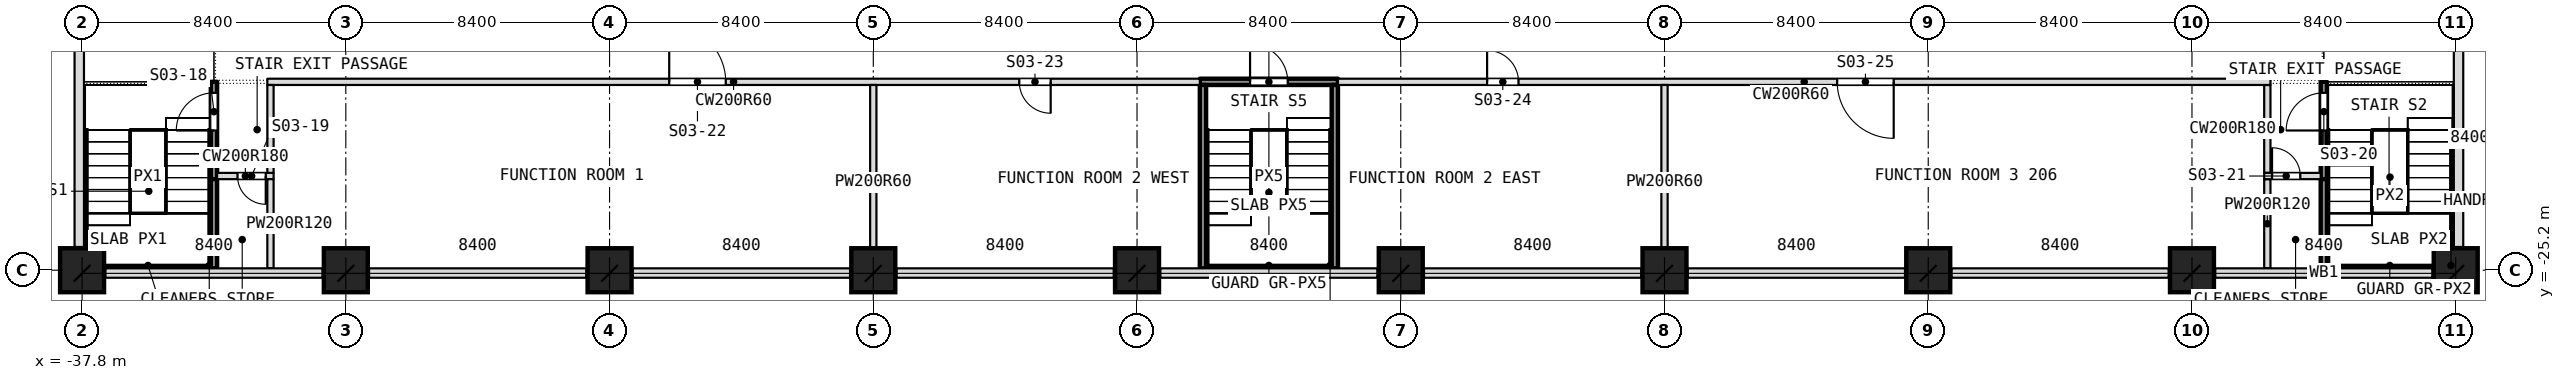
"""IFC4 building model, lengths in metres.
Left out: names, types, materials, properties, quantities, classifications, styles, units other than length and angle.
Written with IfcOpenShell. Run it as: python <this file> out.ifc"""

import sys

from ifc_helpers import new_model, si_unit, direction, frame, frame_2d, origin, origin_2d, place, context, subcontext, project, spatial, polyline, rectangle, outline, extrude, element, fill, save


model = new_model("IFC4")
c1 = context("Model", 3, precision=1e-05, world=origin(), true_north=direction((0.0, 1.0)))
c2 = subcontext(c1, "Body", "Model", "MODEL_VIEW")
j1 = project(units=[si_unit("LENGTHUNIT", "METRE"), si_unit("PLANEANGLEUNIT", "RADIAN")], contexts=[c1])
p1 = place(None, origin())
s1 = spatial("IfcSite", under=j1, at=p1, CompositionType="ELEMENT")
p2 = place(p1, origin())
s2 = spatial("IfcBuilding", under=s1, at=p2, CompositionType="ELEMENT")
p3 = place(p2, frame((0.0, 0.0, 13.0)))
s3 = spatial("IfcBuildingStorey", under=s2, at=p3, CompositionType="ELEMENT", Elevation=13.0)
for number, where, z_axis, x_axis in (
    (1, (-37.8, -25.2, 0.0), (0.0, 0.0, 1.0), (1.0, 0.0, 0.0)),
    (2, (-29.4, -25.2, 0.0), (0.0, 0.0, 1.0), (1.0, 0.0, 0.0)),
    (3, (-21.0, -25.2, 0.0), (0.0, 0.0, 1.0), (1.0, 0.0, 0.0)),
    (4, (-12.6, -25.2, 0.0), (0.0, 0.0, 1.0), (1.0, 0.0, 0.0)),
    (5, (-4.2, -25.2, 0.0), (0.0, 0.0, 1.0), (1.0, 0.0, 0.0)),
    (6, (4.2, -25.2, 0.0), (0.0, 0.0, 1.0), (1.0, 0.0, 0.0)),
    (7, (12.6, -25.2, 0.0), (0.0, 0.0, 1.0), (1.0, 0.0, 0.0)),
    (8, (21.0, -25.2, 0.0), (0.0, 0.0, 1.0), (1.0, 0.0, 0.0)),
    (9, (29.4, -25.2, 0.0), (0.0, 0.0, 1.0), (1.0, 0.0, 0.0)),
    (10, (37.8, -25.2, 0.0), (0.0, 0.0, 1.0), (1.0, 0.0, 0.0)),
):
    element("IfcColumn", number, at=place(p3, frame(where, z_axis=z_axis, x_axis=x_axis)), inside=s3, PredefinedType="COLUMN", context=c2, shape_type="SweptSolid", body=[
        extrude(rectangle(XDim=1.4, YDim=1.4, at=origin_2d()), origin(), (0.0, 0.0, 1.0), 8.0),
    ])
p4 = place(p3, frame((37.8, -18.0, 7.414), z_axis=(1.0, 0.0, 0.0), x_axis=(0.0, 0.449444543056, 0.893308234999)))
e11 = element("IfcWall", 11, at=p4, inside=s3, PredefinedType="SOLIDWALL", context=c2, shape_type="SweptSolid", body=[
    extrude(outline(polyline([(0.0, 0.0), (0.656, 0.0), (-0.016, 1.335), (-7.162, -2.26), (0.0, 0.0)])), origin(), (0.0, 0.0, -1.0), 4.2),
])
p5 = place(p3, frame((-37.8, -18.0, 7.414), z_axis=(-1.0, 0.0, 0.0), x_axis=(0.0, -0.159774095721, -0.987153604226)))
e12 = element("IfcWall", 12, at=p5, inside=s3, PredefinedType="SOLIDWALL", context=c2, shape_type="SweptSolid", body=[
    extrude(outline(polyline([(0.0, 0.0), (7.51, 2.22e-16), (-0.387, 1.278), (-0.626, -0.197), (0.0, 0.0)])), origin(), (0.0, 0.0, -1.0), 4.2),
])
p6 = place(p3, frame((33.6, -25.14, 0.0), z_axis=(0.0, 0.0, 1.0), x_axis=(0.0, 1.0, 0.0)))
e13 = element("IfcWall", 13, at=p6, inside=s3, PredefinedType="PARTITIONING", context=c2, shape_type="SweptSolid", body=[
    extrude(rectangle(XDim=3.04, YDim=0.2, at=frame_2d((1.52, 0.0))), origin(), (0.0, 0.0, 1.0), 7.68),
])
p7 = place(p3, frame((33.6, -22.3, 0.0), z_axis=(0.0, 0.0, 1.0), x_axis=(0.0, 1.0, 0.0)))
e14 = element("IfcWall", 14, at=p7, inside=s3, PredefinedType="PARTITIONING", context=c2, shape_type="SweptSolid", body=[
    extrude(rectangle(XDim=3.1, YDim=0.2, at=frame_2d((1.55, 0.0))), origin(), (0.0, 0.0, 1.0), 7.68),
])
p8 = place(p7, frame((1.55, 0.0, 0.0)))
e15 = element("IfcOpeningElement", 15, at=p8, cuts=e14, PredefinedType="OPENING", context=c2, shape_type="SweptSolid", body=[
    extrude(rectangle(XDim=1.2, YDim=2.1, at=frame_2d((0.6, 1.05))), frame((0.0, 0.1, 0.0), z_axis=(0.0, -1.0, 0.0), x_axis=(1.0, 0.0, 0.0)), (0.0, 0.0, 1.0), 0.2),
])
p9 = place(p3, frame((31.8, -25.14, 0.0), z_axis=(0.0, 0.0, 1.0), x_axis=(0.0, 1.0, 0.0)))
e16 = element("IfcWall", 16, at=p9, inside=s3, PredefinedType="PARTITIONING", context=c2, shape_type="SweptSolid", body=[
    extrude(rectangle(XDim=2.84, YDim=0.2, at=frame_2d((1.42, 0.0))), origin(), (0.0, 0.0, 1.0), 7.68),
])
p10 = place(p3, frame((31.8, -22.1, 0.0), z_axis=(0.0, 0.0, 1.0), x_axis=(0.0, 1.0, 0.0)))
e17 = element("IfcWall", 17, at=p10, inside=s3, PredefinedType="PARTITIONING", context=c2, shape_type="SweptSolid", body=[
    extrude(rectangle(XDim=2.8, YDim=0.2, at=frame_2d((1.4, 0.0))), origin(), (0.0, 0.0, 1.0), 7.68),
])
p11 = place(p3, frame((-33.5, -22.2, 0.0), z_axis=(0.0, 0.0, 1.0), x_axis=(1.0, 0.0, 0.0)))
e18 = element("IfcWall", 18, at=p11, inside=s3, PredefinedType="PARTITIONING", context=c2, shape_type="SweptSolid", body=[
    extrude(rectangle(XDim=1.8, YDim=0.2, at=frame_2d((0.9, 0.0))), origin(), (0.0, 0.0, 1.0), 7.68),
])
p12 = place(p11, frame((0.65, 0.0, 0.0)))
e19 = element("IfcOpeningElement", 19, at=p12, cuts=e18, PredefinedType="OPENING", context=c2, shape_type="SweptSolid", body=[
    extrude(rectangle(XDim=0.9, YDim=2.1, at=frame_2d((0.45, 1.05))), frame((0.0, 0.1, 0.0), z_axis=(0.0, -1.0, 0.0), x_axis=(1.0, 0.0, 0.0)), (0.0, 0.0, 1.0), 0.2),
])
p13 = place(p3, frame((31.7, -22.2, 0.0), z_axis=(0.0, 0.0, 1.0), x_axis=(1.0, 0.0, 0.0)))
e20 = element("IfcWall", 20, at=p13, inside=s3, PredefinedType="PARTITIONING", context=c2, shape_type="SweptSolid", body=[
    extrude(rectangle(XDim=1.8, YDim=0.2, at=frame_2d((0.9, 0.0))), origin(), (0.0, 0.0, 1.0), 7.68),
])
p14 = place(p13, frame((0.25, 0.0, 0.0)))
e21 = element("IfcOpeningElement", 21, at=p14, cuts=e20, PredefinedType="OPENING", context=c2, shape_type="SweptSolid", body=[
    extrude(rectangle(XDim=0.9, YDim=2.1, at=frame_2d((0.45, 1.05))), frame((0.0, 0.1, 0.0), z_axis=(0.0, -1.0, 0.0), x_axis=(1.0, 0.0, 0.0)), (0.0, 0.0, 1.0), 0.2),
])
p15 = place(p3, frame((-31.9, -19.2, 0.0), z_axis=(0.0, 0.0, 1.0), x_axis=(1.0, 0.0, 0.0)))
e22 = element("IfcWall", 22, at=p15, inside=s3, PredefinedType="PARTITIONING", context=c2, shape_type="SweptSolid", body=[
    extrude(rectangle(XDim=29.7, YDim=0.2, at=frame_2d((14.85, 0.0))), origin(), (0.0, 0.0, 1.0), 7.68),
])
p16 = place(p15, frame((12.8, 0.0, 0.0)))
e23 = element("IfcOpeningElement", 23, at=p16, cuts=e22, PredefinedType="OPENING", context=c2, shape_type="SweptSolid", body=[
    extrude(rectangle(XDim=1.8, YDim=2.1, at=frame_2d((0.9, 1.05))), frame((0.0, 0.1, 0.0), z_axis=(0.0, -1.0, 0.0), x_axis=(1.0, 0.0, 0.0)), (0.0, 0.0, 1.0), 0.2),
])
p17 = place(p15, frame((23.95, 0.0, 0.0)))
e24 = element("IfcOpeningElement", 24, at=p17, cuts=e22, PredefinedType="OPENING", context=c2, shape_type="SweptSolid", body=[
    extrude(rectangle(XDim=1.0, YDim=2.1, at=frame_2d((0.5, 1.05))), frame((0.0, 0.1, 0.0), z_axis=(0.0, -1.0, 0.0), x_axis=(1.0, 0.0, 0.0)), (0.0, 0.0, 1.0), 0.2),
])
p18 = place(p3, frame((2.2, -19.2, 0.0), z_axis=(0.0, 0.0, 1.0), x_axis=(1.0, 0.0, 0.0)))
e25 = element("IfcWall", 25, at=p18, inside=s3, PredefinedType="PARTITIONING", context=c2, shape_type="SweptSolid", body=[
    extrude(rectangle(XDim=29.7, YDim=0.2, at=frame_2d((14.85, 0.0))), origin(), (0.0, 0.0, 1.0), 7.68),
])
p19 = place(p18, frame((4.75, 0.0, 0.0)))
e26 = element("IfcOpeningElement", 26, at=p19, cuts=e25, PredefinedType="OPENING", context=c2, shape_type="SweptSolid", body=[
    extrude(rectangle(XDim=1.0, YDim=2.1, at=frame_2d((0.5, 1.05))), frame((0.0, 0.1, 0.0), z_axis=(0.0, -1.0, 0.0), x_axis=(1.0, 0.0, 0.0)), (0.0, 0.0, 1.0), 0.2),
])
p20 = place(p18, frame((15.9, 0.0, 0.0)))
e27 = element("IfcOpeningElement", 27, at=p20, cuts=e25, PredefinedType="OPENING", context=c2, shape_type="SweptSolid", body=[
    extrude(rectangle(XDim=1.8, YDim=2.1, at=frame_2d((0.9, 1.05))), frame((0.0, 0.1, 0.0), z_axis=(0.0, -1.0, 0.0), x_axis=(1.0, 0.0, 0.0)), (0.0, 0.0, 1.0), 0.2),
])
p21 = place(p3, frame((-2.2, -19.2, 0.0), z_axis=(0.0, 0.0, 1.0), x_axis=(1.0, 0.0, 0.0)))
e28 = element("IfcWall", 28, at=p21, inside=s3, PredefinedType="PARTITIONING", context=c2, shape_type="SweptSolid", body=[
    extrude(rectangle(XDim=4.4, YDim=0.2, at=frame_2d((2.2, 0.0))), origin(), (0.0, 0.0, 1.0), 7.68),
])
p22 = place(p21, frame((1.6, 0.0, 0.0)))
e29 = element("IfcOpeningElement", 29, at=p22, cuts=e28, PredefinedType="OPENING", context=c2, shape_type="SweptSolid", body=[
    extrude(rectangle(XDim=1.2, YDim=2.1, at=frame_2d((0.6, 1.05))), frame((0.0, 0.1, 0.0), z_axis=(0.0, -1.0, 0.0), x_axis=(1.0, 0.0, 0.0)), (0.0, 0.0, 1.0), 0.2),
])
p23 = place(p3, frame((12.6, -25.5, 0.0), z_axis=(0.0, 0.0, 1.0), x_axis=(0.0, 1.0, 0.0)))
e30 = element("IfcWall", 30, at=p23, inside=s3, PredefinedType="PARTITIONING", context=c2, shape_type="SweptSolid", body=[
    extrude(rectangle(XDim=6.2, YDim=0.2, at=frame_2d((3.1, 0.0))), origin(), (0.0, 0.0, 1.0), 7.68),
])
for number, where, z_axis, x_axis in (
    (31, (2.1, -25.14, 0.0), (0.0, 0.0, 1.0), (0.0, 1.0, 0.0)),
    (32, (-2.1, -25.14, 0.0), (0.0, 0.0, 1.0), (0.0, 1.0, 0.0)),
):
    element("IfcWall", number, at=place(p3, frame(where, z_axis=z_axis, x_axis=x_axis)), inside=s3, PredefinedType="PARTITIONING", context=c2, shape_type="SweptSolid", body=[
        extrude(rectangle(XDim=5.84, YDim=0.2, at=frame_2d((2.92, 0.0))), origin(), (0.0, 0.0, 1.0), 7.68),
    ])
p24 = place(p3, frame((-12.6, -25.5, 0.0), z_axis=(0.0, 0.0, 1.0), x_axis=(0.0, 1.0, 0.0)))
e33 = element("IfcWall", 33, at=p24, inside=s3, PredefinedType="PARTITIONING", context=c2, shape_type="SweptSolid", body=[
    extrude(rectangle(XDim=6.2, YDim=0.2, at=frame_2d((3.1, 0.0))), origin(), (0.0, 0.0, 1.0), 7.68),
])
p25 = place(p3, frame((-31.8, -25.14, 0.0), z_axis=(0.0, 0.0, 1.0), x_axis=(0.0, 1.0, 0.0)))
e34 = element("IfcWall", 34, at=p25, inside=s3, PredefinedType="PARTITIONING", context=c2, shape_type="SweptSolid", body=[
    extrude(rectangle(XDim=2.84, YDim=0.2, at=frame_2d((1.42, 0.0))), origin(), (0.0, 0.0, 1.0), 7.68),
])
p26 = place(p3, frame((-31.8, -22.1, 0.0), z_axis=(0.0, 0.0, 1.0), x_axis=(0.0, 1.0, 0.0)))
e35 = element("IfcWall", 35, at=p26, inside=s3, PredefinedType="PARTITIONING", context=c2, shape_type="SweptSolid", body=[
    extrude(rectangle(XDim=2.8, YDim=0.2, at=frame_2d((1.4, 0.0))), origin(), (0.0, 0.0, 1.0), 7.68),
])
p27 = place(p3, frame((-33.6, -25.14, 0.0), z_axis=(0.0, 0.0, 1.0), x_axis=(0.0, 1.0, 0.0)))
e36 = element("IfcWall", 36, at=p27, inside=s3, PredefinedType="PARTITIONING", context=c2, shape_type="SweptSolid", body=[
    extrude(rectangle(XDim=3.04, YDim=0.2, at=frame_2d((1.52, 0.0))), origin(), (0.0, 0.0, 1.0), 7.68),
])
p28 = place(p3, frame((-33.6, -22.3, 0.0), z_axis=(0.0, 0.0, 1.0), x_axis=(0.0, 1.0, 0.0)))
e37 = element("IfcWall", 37, at=p28, inside=s3, PredefinedType="PARTITIONING", context=c2, shape_type="SweptSolid", body=[
    extrude(rectangle(XDim=3.1, YDim=0.2, at=frame_2d((1.55, 0.0))), origin(), (0.0, 0.0, 1.0), 7.68),
])
p29 = place(p28, frame((1.55, 0.0, 0.0)))
e38 = element("IfcOpeningElement", 38, at=p29, cuts=e37, PredefinedType="OPENING", context=c2, shape_type="SweptSolid", body=[
    extrude(rectangle(XDim=1.2, YDim=2.1, at=frame_2d((0.6, 1.05))), frame((0.0, 0.1, 0.0), z_axis=(0.0, -1.0, 0.0), x_axis=(1.0, 0.0, 0.0)), (0.0, 0.0, 1.0), 0.2),
])
p30 = place(p3, frame((-37.06, -25.29, 0.0), z_axis=(0.0, 0.0, 1.0), x_axis=(1.0, 0.0, 0.0)))
e39 = element("IfcWall", 39, at=p30, inside=s3, PredefinedType="NOTDEFINED", context=c2, shape_type="SweptSolid", body=[
    extrude(rectangle(XDim=6.92, YDim=0.3, at=frame_2d((3.46, 0.0))), origin(), (0.0, 0.0, 1.0), 6.78),
])
for number, where, z_axis, x_axis in (
    (40, (-28.66, -25.29, 0.0), (0.0, 0.0, 1.0), (1.0, 0.0, 0.0)),
    (41, (-20.26, -25.29, 0.0), (0.0, 0.0, 1.0), (1.0, 0.0, 0.0)),
):
    element("IfcWall", number, at=place(p3, frame(where, z_axis=z_axis, x_axis=x_axis)), inside=s3, PredefinedType="NOTDEFINED", context=c2, shape_type="SweptSolid", body=[
        extrude(rectangle(XDim=6.92, YDim=0.3, at=frame_2d((3.46, 0.0))), origin(), (0.0, 0.0, 1.0), 6.78),
    ])
p31 = place(p3, frame((-11.86, -25.29, 0.0), z_axis=(0.0, 0.0, 1.0), x_axis=(1.0, 0.0, 0.0)))
e42 = element("IfcWall", 42, at=p31, inside=s3, PredefinedType="NOTDEFINED", context=c2, shape_type="SweptSolid", body=[
    extrude(rectangle(XDim=6.92, YDim=0.3, at=frame_2d((3.46, 0.0))), origin(), (0.0, 0.0, 1.0), 6.78),
])
p32 = place(p3, frame((-3.46, -25.29, 0.0), z_axis=(0.0, 0.0, 1.0), x_axis=(1.0, 0.0, 0.0)))
e43 = element("IfcWall", 43, at=p32, inside=s3, PredefinedType="NOTDEFINED", context=c2, shape_type="SweptSolid", body=[
    extrude(rectangle(XDim=6.92, YDim=0.3, at=frame_2d((3.46, 0.0))), origin(), (0.0, 0.0, 1.0), 6.78),
])
p33 = place(p3, frame((4.94, -25.29, 0.0), z_axis=(0.0, 0.0, 1.0), x_axis=(1.0, 0.0, 0.0)))
e44 = element("IfcWall", 44, at=p33, inside=s3, PredefinedType="NOTDEFINED", context=c2, shape_type="SweptSolid", body=[
    extrude(rectangle(XDim=6.92, YDim=0.3, at=frame_2d((3.46, 0.0))), origin(), (0.0, 0.0, 1.0), 6.78),
])
for number, where, z_axis, x_axis in (
    (45, (13.34, -25.29, 0.0), (0.0, 0.0, 1.0), (1.0, 0.0, 0.0)),
    (46, (21.74, -25.29, 0.0), (0.0, 0.0, 1.0), (1.0, 0.0, 0.0)),
):
    element("IfcWall", number, at=place(p3, frame(where, z_axis=z_axis, x_axis=x_axis)), inside=s3, PredefinedType="NOTDEFINED", context=c2, shape_type="SweptSolid", body=[
        extrude(rectangle(XDim=6.92, YDim=0.3, at=frame_2d((3.46, 0.0))), origin(), (0.0, 0.0, 1.0), 6.78),
    ])
p34 = place(p3, frame((30.14, -25.29, 0.0), z_axis=(0.0, 0.0, 1.0), x_axis=(1.0, 0.0, 0.0)))
e47 = element("IfcWall", 47, at=p34, inside=s3, PredefinedType="NOTDEFINED", context=c2, shape_type="SweptSolid", body=[
    extrude(rectangle(XDim=6.92, YDim=0.3, at=frame_2d((3.46, 0.0))), origin(), (0.0, 0.0, 1.0), 6.78),
])
for number, where, z_axis, x_axis in (
    (48, (37.89, -24.46, 0.0), (0.0, 0.0, 1.0), (0.0, 1.0, 0.0)),
    (49, (-37.89, -16.8, 0.0), (0.0, 0.0, 1.0), (0.0, -1.0, 0.0)),
):
    element("IfcWall", number, at=place(p3, frame(where, z_axis=z_axis, x_axis=x_axis)), inside=s3, PredefinedType="NOTDEFINED", context=c2, shape_type="SweptSolid", body=[
        extrude(rectangle(XDim=7.66, YDim=0.3, at=frame_2d((3.83, 0.0))), origin(), (0.0, 0.0, 1.0), 6.78),
    ])
p35 = place(p29, origin())
e50 = element("IfcDoor", 50, at=p35, inside=s3, OperationType="SINGLE_SWING_RIGHT", PredefinedType="DOOR", context=c2, shape_type="SweptSolid", body=[
    extrude(rectangle(XDim=1.2, YDim=2.1, at=frame_2d((0.6, 1.05))), frame((0.0, 0.025, 0.0), z_axis=(0.0, -1.0, 0.0), x_axis=(1.0, 0.0, 0.0)), (0.0, 0.0, 1.0), 0.05),
])
fill(e38, e50)
p36 = place(p12, origin())
e51 = element("IfcDoor", 51, at=p36, inside=s3, OperationType="SINGLE_SWING_LEFT", PredefinedType="DOOR", context=c2, shape_type="SweptSolid", body=[
    extrude(rectangle(XDim=0.9, YDim=2.1, at=frame_2d((0.45, 1.05))), frame((0.0, 0.025, 0.0), z_axis=(0.0, -1.0, 0.0), x_axis=(1.0, 0.0, 0.0)), (0.0, 0.0, 1.0), 0.05),
])
fill(e19, e51)
p37 = place(p8, origin())
e52 = element("IfcDoor", 52, at=p37, inside=s3, OperationType="SINGLE_SWING_LEFT", PredefinedType="DOOR", context=c2, shape_type="SweptSolid", body=[
    extrude(rectangle(XDim=1.2, YDim=2.1, at=frame_2d((0.6, 1.05))), frame((0.0, 0.025, 0.0), z_axis=(0.0, -1.0, 0.0), x_axis=(1.0, 0.0, 0.0)), (0.0, 0.0, 1.0), 0.05),
])
fill(e15, e52)
p38 = place(p14, origin())
e53 = element("IfcDoor", 53, at=p38, inside=s3, OperationType="SINGLE_SWING_RIGHT", PredefinedType="DOOR", context=c2, shape_type="SweptSolid", body=[
    extrude(rectangle(XDim=0.9, YDim=2.1, at=frame_2d((0.45, 1.05))), frame((0.0, 0.025, 0.0), z_axis=(0.0, -1.0, 0.0), x_axis=(1.0, 0.0, 0.0)), (0.0, 0.0, 1.0), 0.05),
])
fill(e21, e53)
p39 = place(p16, origin())
e54 = element("IfcDoor", 54, at=p39, inside=s3, OperationType="DOUBLE_DOOR_SINGLE_SWING", PredefinedType="DOOR", context=c2, shape_type="SweptSolid", body=[
    extrude(rectangle(XDim=1.8, YDim=2.1, at=frame_2d((0.9, 1.05))), frame((0.0, 0.025, 0.0), z_axis=(0.0, -1.0, 0.0), x_axis=(1.0, 0.0, 0.0)), (0.0, 0.0, 1.0), 0.05),
])
fill(e23, e54)
p40 = place(p17, origin())
e55 = element("IfcDoor", 55, at=p40, inside=s3, OperationType="SINGLE_SWING_RIGHT", PredefinedType="DOOR", context=c2, shape_type="SweptSolid", body=[
    extrude(rectangle(XDim=1.0, YDim=2.1, at=frame_2d((0.5, 1.05))), frame((0.0, 0.025, 0.0), z_axis=(0.0, -1.0, 0.0), x_axis=(1.0, 0.0, 0.0)), (0.0, 0.0, 1.0), 0.05),
])
fill(e24, e55)
p41 = place(p19, origin())
e56 = element("IfcDoor", 56, at=p41, inside=s3, OperationType="SINGLE_SWING_LEFT", PredefinedType="DOOR", context=c2, shape_type="SweptSolid", body=[
    extrude(rectangle(XDim=1.0, YDim=2.1, at=frame_2d((0.5, 1.05))), frame((0.0, 0.025, 0.0), z_axis=(0.0, -1.0, 0.0), x_axis=(1.0, 0.0, 0.0)), (0.0, 0.0, 1.0), 0.05),
])
fill(e26, e56)
p42 = place(p20, origin())
e57 = element("IfcDoor", 57, at=p42, inside=s3, OperationType="DOUBLE_DOOR_SINGLE_SWING", PredefinedType="DOOR", context=c2, shape_type="SweptSolid", body=[
    extrude(rectangle(XDim=1.8, YDim=2.1, at=frame_2d((0.9, 1.05))), frame((0.0, 0.025, 0.0), z_axis=(0.0, -1.0, 0.0), x_axis=(1.0, 0.0, 0.0)), (0.0, 0.0, 1.0), 0.05),
])
fill(e27, e57)
p43 = place(p22, origin())
e58 = element("IfcDoor", 58, at=p43, inside=s3, OperationType="SINGLE_SWING_RIGHT", PredefinedType="DOOR", context=c2, shape_type="SweptSolid", body=[
    extrude(rectangle(XDim=1.2, YDim=2.1, at=frame_2d((0.6, 1.05))), frame((0.0, 0.025, 0.0), z_axis=(0.0, -1.0, 0.0), x_axis=(1.0, 0.0, 0.0)), (0.0, 0.0, 1.0), 0.05),
])
fill(e29, e58)
save(model, sys.argv[1])
